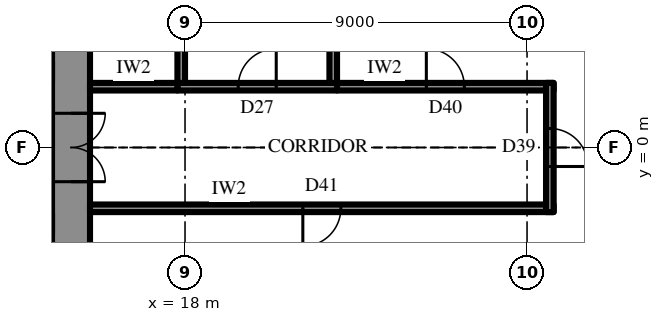
"""IFC4 building model, lengths in metres.
Left out: names, types, materials, properties, quantities, classifications, styles, units other than length and angle.
Written with IfcOpenShell. Run it as: python <this file> out.ifc"""

import sys

from ifc_helpers import new_model, si_unit, direction, frame, frame_2d, origin, place, context, subcontext, project, spatial, rectangle, extrude, element, fill, save


model = new_model("IFC4")
c1 = context("Model", 3, precision=1e-05, world=origin(), true_north=direction((0.0, 1.0)))
c2 = subcontext(c1, "Body", "Model", "MODEL_VIEW")
j1 = project(units=[si_unit("LENGTHUNIT", "METRE"), si_unit("PLANEANGLEUNIT", "RADIAN")], contexts=[c1])
p1 = place(None, origin())
s1 = spatial("IfcSite", under=j1, at=p1, CompositionType="ELEMENT")
p2 = place(p1, origin())
s2 = spatial("IfcBuilding", under=s1, at=p2, CompositionType="ELEMENT")
p3 = place(p2, frame((0.0, 0.0, 249.1)))
s3 = spatial("IfcBuildingStorey", under=s2, at=p3, CompositionType="ELEMENT", Elevation=249.1)
p4 = place(p3, frame((15.0, -10.7, 0.0), z_axis=(0.0, 0.0, 1.0), x_axis=(0.0, 1.0, 0.0)))
e1 = element("IfcWall", 1, at=p4, inside=s3, PredefinedType="SHEAR", context=c2, shape_type="SweptSolid", body=[
    extrude(rectangle(XDim=21.4, YDim=1.0, at=frame_2d((10.7, 0.0))), origin(), (0.0, 0.0, 1.0), 4.2),
])
p5 = place(p4, frame((9.8, 0.0, 0.0)))
e2 = element("IfcOpeningElement", 2, at=p5, cuts=e1, PredefinedType="OPENING", context=c2, shape_type="SweptSolid", body=[
    extrude(rectangle(XDim=1.8, YDim=2.4, at=frame_2d((0.9, 1.2))), frame((0.0, 0.51, 0.0), z_axis=(0.0, -1.0, 0.0), x_axis=(1.0, 0.0, 0.0)), (0.0, 0.0, 1.0), 1.02),
])
p6 = place(p3, frame((12.3, 2.0, 0.0), z_axis=(0.0, 0.0, 1.0), x_axis=(1.0, 0.0, 0.0)))
e3 = element("IfcWall", 3, at=p6, inside=s3, PredefinedType="SHEAR", context=c2, shape_type="SweptSolid", body=[
    extrude(rectangle(XDim=2.2, YDim=0.5, at=frame_2d((1.1, 0.0))), origin(), (0.0, 0.0, 1.0), 4.2),
])
p7 = place(p6, frame((0.8, 0.0, 0.0)))
e4 = element("IfcOpeningElement", 4, at=p7, cuts=e3, PredefinedType="OPENING", context=c2, shape_type="SweptSolid", body=[
    extrude(rectangle(XDim=0.9, YDim=2.2, at=frame_2d((0.45, 1.1))), frame((0.0, 0.26, 0.0), z_axis=(0.0, -1.0, 0.0), x_axis=(1.0, 0.0, 0.0)), (0.0, 0.0, 1.0), 0.52),
])
p8 = place(p3, frame((17.8, 1.6, 0.0), z_axis=(0.0, 0.0, 1.0), x_axis=(1.0, 0.0, 0.0)))
e5 = element("IfcWall", 5, at=p8, inside=s3, PredefinedType="PARTITIONING", context=c2, shape_type="SweptSolid", body=[
    extrude(rectangle(XDim=4.2, YDim=0.2, at=frame_2d((2.1, 0.0))), origin(), (0.0, 0.0, 1.0), 4.0),
])
p9 = place(p8, frame((1.6, 0.0, 0.0)))
e6 = element("IfcOpeningElement", 6, at=p9, cuts=e5, PredefinedType="OPENING", context=c2, shape_type="SweptSolid", body=[
    extrude(rectangle(XDim=1.0, YDim=2.2, at=frame_2d((0.5, 1.1))), frame((0.0, 0.11, 0.0), z_axis=(0.0, -1.0, 0.0), x_axis=(1.0, 0.0, 0.0)), (0.0, 0.0, 1.0), 0.22),
])
for number, where, z_axis, x_axis in (
    (7, (17.9, 1.7, 0.0), (0.0, 0.0, 1.0), (0.0, 1.0, 0.0)),
    (8, (21.9, 1.7, 0.0), (0.0, 0.0, 1.0), (0.0, 1.0, 0.0)),
):
    element("IfcWall", number, at=place(p3, frame(where, z_axis=z_axis, x_axis=x_axis)), inside=s3, PredefinedType="PARTITIONING", context=c2, shape_type="SweptSolid", body=[
        extrude(rectangle(XDim=3.8, YDim=0.2, at=frame_2d((1.9, 0.0))), origin(), (0.0, 0.0, 1.0), 4.0),
    ])
p10 = place(p3, frame((15.5, 1.6, 0.0), z_axis=(0.0, 0.0, 1.0), x_axis=(1.0, 0.0, 0.0)))
e9 = element("IfcWall", 9, at=p10, inside=s3, PredefinedType="PARTITIONING", context=c2, shape_type="SweptSolid", body=[
    extrude(rectangle(XDim=2.3, YDim=0.2, at=frame_2d((1.15, 0.0))), origin(), (0.0, 0.0, 1.0), 4.0),
])
p11 = place(p3, frame((22.0, 1.6, 0.0), z_axis=(0.0, 0.0, 1.0), x_axis=(1.0, 0.0, 0.0)))
e10 = element("IfcWall", 10, at=p11, inside=s3, PredefinedType="PARTITIONING", context=c2, shape_type="SweptSolid", body=[
    extrude(rectangle(XDim=5.7, YDim=0.2, at=frame_2d((2.85, 0.0))), origin(), (0.0, 0.0, 1.0), 4.0),
])
p12 = place(p11, frame((2.35, 0.0, 0.0)))
e11 = element("IfcOpeningElement", 11, at=p12, cuts=e10, PredefinedType="OPENING", context=c2, shape_type="SweptSolid", body=[
    extrude(rectangle(XDim=1.0, YDim=2.2, at=frame_2d((0.5, 1.1))), frame((0.0, 0.11, 0.0), z_axis=(0.0, -1.0, 0.0), x_axis=(1.0, 0.0, 0.0)), (0.0, 0.0, 1.0), 0.22),
])
p13 = place(p3, frame((15.5, -1.6, 0.0), z_axis=(0.0, 0.0, 1.0), x_axis=(1.0, 0.0, 0.0)))
e12 = element("IfcWall", 12, at=p13, inside=s3, PredefinedType="PARTITIONING", context=c2, shape_type="SweptSolid", body=[
    extrude(rectangle(XDim=12.2, YDim=0.2, at=frame_2d((6.1, 0.0))), origin(), (0.0, 0.0, 1.0), 4.0),
])
p14 = place(p13, frame((5.6, 0.0, 0.0)))
e13 = element("IfcOpeningElement", 13, at=p14, cuts=e12, PredefinedType="OPENING", context=c2, shape_type="SweptSolid", body=[
    extrude(rectangle(XDim=1.0, YDim=2.2, at=frame_2d((0.5, 1.1))), frame((0.0, 0.11, 0.0), z_axis=(0.0, -1.0, 0.0), x_axis=(1.0, 0.0, 0.0)), (0.0, 0.0, 1.0), 0.22),
])
p15 = place(p3, frame((27.6, -1.7, 0.0), z_axis=(0.0, 0.0, 1.0), x_axis=(0.0, 1.0, 0.0)))
e14 = element("IfcWall", 14, at=p15, inside=s3, PredefinedType="PARTITIONING", context=c2, shape_type="SweptSolid", body=[
    extrude(rectangle(XDim=3.4, YDim=0.2, at=frame_2d((1.7, 0.0))), origin(), (0.0, 0.0, 1.0), 4.0),
])
p16 = place(p15, frame((1.2, 0.0, 0.0)))
e15 = element("IfcOpeningElement", 15, at=p16, cuts=e14, PredefinedType="OPENING", context=c2, shape_type="SweptSolid", body=[
    extrude(rectangle(XDim=1.0, YDim=2.2, at=frame_2d((0.5, 1.1))), frame((0.0, 0.11, 0.0), z_axis=(0.0, -1.0, 0.0), x_axis=(1.0, 0.0, 0.0)), (0.0, 0.0, 1.0), 0.22),
])
p17 = place(p5, frame((1.8, 0.0, 0.0), z_axis=(0.0, 0.0, 1.0), x_axis=(-1.0, 0.0, 0.0)))
e16 = element("IfcDoor", 16, at=p17, inside=s3, OperationType="DOUBLE_DOOR_SINGLE_SWING", PredefinedType="DOOR", context=c2, shape_type="SweptSolid", body=[
    extrude(rectangle(XDim=1.8, YDim=2.4, at=frame_2d((0.9, 1.2))), frame((0.0, 0.025, 0.0), z_axis=(0.0, -1.0, 0.0), x_axis=(1.0, 0.0, 0.0)), (0.0, 0.0, 1.0), 0.05),
])
fill(e2, e16)
p18 = place(p9, origin())
e17 = element("IfcDoor", 17, at=p18, inside=s3, OperationType="SINGLE_SWING_LEFT", PredefinedType="DOOR", context=c2, shape_type="SweptSolid", body=[
    extrude(rectangle(XDim=1.0, YDim=2.2, at=frame_2d((0.5, 1.1))), frame((0.0, 0.025, 0.0), z_axis=(0.0, -1.0, 0.0), x_axis=(1.0, 0.0, 0.0)), (0.0, 0.0, 1.0), 0.05),
])
fill(e6, e17)
p19 = place(p12, origin())
e18 = element("IfcDoor", 18, at=p19, inside=s3, OperationType="SINGLE_SWING_RIGHT", PredefinedType="DOOR", context=c2, shape_type="SweptSolid", body=[
    extrude(rectangle(XDim=1.0, YDim=2.2, at=frame_2d((0.5, 1.1))), frame((0.0, 0.025, 0.0), z_axis=(0.0, -1.0, 0.0), x_axis=(1.0, 0.0, 0.0)), (0.0, 0.0, 1.0), 0.05),
])
fill(e11, e18)
p20 = place(p14, frame((1.0, 0.0, 0.0), z_axis=(0.0, 0.0, 1.0), x_axis=(-1.0, 0.0, 0.0)))
e19 = element("IfcDoor", 19, at=p20, inside=s3, OperationType="SINGLE_SWING_LEFT", PredefinedType="DOOR", context=c2, shape_type="SweptSolid", body=[
    extrude(rectangle(XDim=1.0, YDim=2.2, at=frame_2d((0.5, 1.1))), frame((0.0, 0.025, 0.0), z_axis=(0.0, -1.0, 0.0), x_axis=(1.0, 0.0, 0.0)), (0.0, 0.0, 1.0), 0.05),
])
fill(e13, e19)
p21 = place(p16, frame((1.0, 0.0, 0.0), z_axis=(0.0, 0.0, 1.0), x_axis=(-1.0, 0.0, 0.0)))
e20 = element("IfcDoor", 20, at=p21, inside=s3, OperationType="SINGLE_SWING_LEFT", PredefinedType="DOOR", context=c2, shape_type="SweptSolid", body=[
    extrude(rectangle(XDim=1.0, YDim=2.2, at=frame_2d((0.5, 1.1))), frame((0.0, 0.025, 0.0), z_axis=(0.0, -1.0, 0.0), x_axis=(1.0, 0.0, 0.0)), (0.0, 0.0, 1.0), 0.05),
])
fill(e15, e20)
save(model, sys.argv[1])
